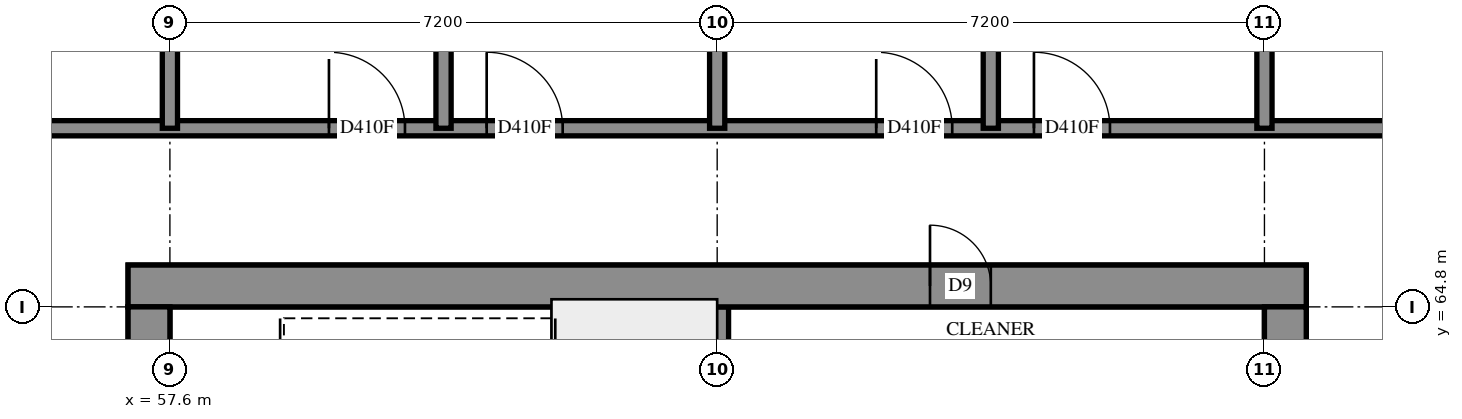
"""IFC4 building model, lengths in metres.
Left out: names, types, materials, properties, quantities, classifications, styles, units other than length and angle.
Written with IfcOpenShell. Run it as: python <this file> out.ifc"""

import sys

from ifc_helpers import new_model, si_unit, direction, frame, frame_2d, origin, place, context, subcontext, project, spatial, rectangle, extrude, element, fill, save


model = new_model("IFC4")
c1 = context("Model", 3, precision=1e-05, world=origin(), true_north=direction((0.0, 1.0)))
c2 = subcontext(c1, "Body", "Model", "MODEL_VIEW")
j1 = project(units=[si_unit("LENGTHUNIT", "METRE"), si_unit("PLANEANGLEUNIT", "RADIAN")], contexts=[c1])
p1 = place(None, origin())
s1 = spatial("IfcSite", under=j1, at=p1, CompositionType="ELEMENT")
p2 = place(p1, origin())
s2 = spatial("IfcBuilding", under=s1, at=p2, CompositionType="ELEMENT")
p3 = place(p2, frame((0.0, 0.0, 180.4)))
s3 = spatial("IfcBuildingStorey", under=s2, at=p3, CompositionType="ELEMENT", Elevation=180.4)
p4 = place(p3, frame((57.05, 65.075, -0.3), z_axis=(0.0, 0.0, 1.0), x_axis=(1.0, 0.0, 0.0)))
e1 = element("IfcWall", 1, at=p4, inside=s3, PredefinedType="SHEAR", context=c2, shape_type="SweptSolid", body=[
    extrude(rectangle(XDim=15.5, YDim=0.55, at=frame_2d((7.75, 0.0))), origin(), (0.0, 0.0, 1.0), 4.3),
])
p5 = place(p4, frame((10.55, 0.0, 0.3)))
e2 = element("IfcOpeningElement", 2, at=p5, cuts=e1, PredefinedType="OPENING", context=c2, shape_type="SweptSolid", body=[
    extrude(rectangle(XDim=0.8, YDim=2.1, at=frame_2d((0.4, 1.05))), frame((0.0, 0.285, 0.0), z_axis=(0.0, -1.0, 0.0), x_axis=(1.0, 0.0, 0.0)), (0.0, 0.0, 1.0), 0.57),
])
p6 = place(p3, frame((57.325, 50.4, -0.3), z_axis=(0.0, 0.0, 1.0), x_axis=(0.0, 1.0, 0.0)))
e3 = element("IfcWall", 3, at=p6, inside=s3, PredefinedType="SHEAR", context=c2, shape_type="SweptSolid", body=[
    extrude(rectangle(XDim=14.4, YDim=0.55, at=frame_2d((7.2, 0.0))), origin(), (0.0, 0.0, 1.0), 4.3),
])
p7 = place(p6, frame((4.55, 0.0, 0.3)))
e4 = element("IfcOpeningElement", 4, at=p7, cuts=e3, PredefinedType="OPENING", context=c2, shape_type="SweptSolid", body=[
    extrude(rectangle(XDim=1.1, YDim=2.1, at=frame_2d((0.55, 1.05))), frame((0.0, 0.285, 0.0), z_axis=(0.0, -1.0, 0.0), x_axis=(1.0, 0.0, 0.0)), (0.0, 0.0, 1.0), 0.57),
])
p8 = place(p6, frame((11.35, 0.0, 0.3)))
e5 = element("IfcOpeningElement", 5, at=p8, cuts=e3, PredefinedType="OPENING", context=c2, shape_type="SweptSolid", body=[
    extrude(rectangle(XDim=1.1, YDim=2.1, at=frame_2d((0.55, 1.05))), frame((0.0, 0.285, 0.0), z_axis=(0.0, -1.0, 0.0), x_axis=(1.0, 0.0, 0.0)), (0.0, 0.0, 1.0), 0.57),
])
p9 = place(p3, frame((72.275, 50.4, -0.3), z_axis=(0.0, 0.0, 1.0), x_axis=(0.0, 1.0, 0.0)))
e6 = element("IfcWall", 6, at=p9, inside=s3, PredefinedType="SHEAR", context=c2, shape_type="SweptSolid", body=[
    extrude(rectangle(XDim=14.4, YDim=0.55, at=frame_2d((7.2, 0.0))), origin(), (0.0, 0.0, 1.0), 4.3),
])
p10 = place(p9, frame((4.55, 0.0, 0.3)))
e7 = element("IfcOpeningElement", 7, at=p10, cuts=e6, PredefinedType="OPENING", context=c2, shape_type="SweptSolid", body=[
    extrude(rectangle(XDim=1.1, YDim=2.1, at=frame_2d((0.55, 1.05))), frame((0.0, 0.285, 0.0), z_axis=(0.0, -1.0, 0.0), x_axis=(1.0, 0.0, 0.0)), (0.0, 0.0, 1.0), 0.57),
])
p11 = place(p9, frame((11.35, 0.0, 0.3)))
e8 = element("IfcOpeningElement", 8, at=p11, cuts=e6, PredefinedType="OPENING", context=c2, shape_type="SweptSolid", body=[
    extrude(rectangle(XDim=1.1, YDim=2.1, at=frame_2d((0.55, 1.05))), frame((0.0, 0.285, 0.0), z_axis=(0.0, -1.0, 0.0), x_axis=(1.0, 0.0, 0.0)), (0.0, 0.0, 1.0), 0.57),
])
p12 = place(p3, frame((64.8, 60.6, 0.0), z_axis=(0.0, 0.0, 1.0), x_axis=(0.0, 1.0, 0.0)))
e9 = element("IfcWall", 9, at=p12, inside=s3, PredefinedType="SOLIDWALL", context=c2, shape_type="SweptSolid", body=[
    extrude(rectangle(XDim=4.2, YDim=0.3, at=frame_2d((2.1, 0.0))), origin(), (0.0, 0.0, 1.0), 4.7),
])
p13 = place(p3, frame((55.25, 67.15, 0.0), z_axis=(0.0, 0.0, 1.0), x_axis=(1.0, 0.0, 0.0)))
e10 = element("IfcWall", 10, at=p13, inside=s3, PredefinedType="PARTITIONING", context=c2, shape_type="SweptSolid", body=[
    extrude(rectangle(XDim=19.1, YDim=0.2, at=frame_2d((9.55, 0.0))), origin(), (0.0, 0.0, 1.0), 4.7),
])
p14 = place(p13, frame((4.442, 0.0, 0.0)))
e11 = element("IfcOpeningElement", 11, at=p14, cuts=e10, PredefinedType="OPENING", context=c2, shape_type="SweptSolid", body=[
    extrude(rectangle(XDim=1.0, YDim=2.1, at=frame_2d((0.5, 1.05))), frame((0.0, 0.11, 0.0), z_axis=(0.0, -1.0, 0.0), x_axis=(1.0, 0.0, 0.0)), (0.0, 0.0, 1.0), 0.22),
])
p15 = place(p13, frame((6.518, 0.0, 0.0)))
e12 = element("IfcOpeningElement", 12, at=p15, cuts=e10, PredefinedType="OPENING", context=c2, shape_type="SweptSolid", body=[
    extrude(rectangle(XDim=1.0, YDim=2.1, at=frame_2d((0.5, 1.05))), frame((0.0, 0.11, 0.0), z_axis=(0.0, -1.0, 0.0), x_axis=(1.0, 0.0, 0.0)), (0.0, 0.0, 1.0), 0.22),
])
p16 = place(p13, frame((11.643, 0.0, 0.0)))
e13 = element("IfcOpeningElement", 13, at=p16, cuts=e10, PredefinedType="OPENING", context=c2, shape_type="SweptSolid", body=[
    extrude(rectangle(XDim=1.0, YDim=2.1, at=frame_2d((0.5, 1.05))), frame((0.0, 0.11, 0.0), z_axis=(0.0, -1.0, 0.0), x_axis=(1.0, 0.0, 0.0)), (0.0, 0.0, 1.0), 0.22),
])
p17 = place(p13, frame((13.717, 0.0, 0.0)))
e14 = element("IfcOpeningElement", 14, at=p17, cuts=e10, PredefinedType="OPENING", context=c2, shape_type="SweptSolid", body=[
    extrude(rectangle(XDim=1.0, YDim=2.1, at=frame_2d((0.5, 1.05))), frame((0.0, 0.11, 0.0), z_axis=(0.0, -1.0, 0.0), x_axis=(1.0, 0.0, 0.0)), (0.0, 0.0, 1.0), 0.22),
])
for number, where, z_axis, x_axis in (
    (15, (57.6, 67.15, 0.0), (0.0, 0.0, 1.0), (0.0, 1.0, 0.0)),
    (16, (61.2, 67.15, 0.0), (0.0, 0.0, 1.0), (0.0, 1.0, 0.0)),
    (17, (64.8, 67.15, 0.0), (0.0, 0.0, 1.0), (0.0, 1.0, 0.0)),
    (18, (68.4, 67.15, 0.0), (0.0, 0.0, 1.0), (0.0, 1.0, 0.0)),
    (19, (72.0, 67.15, 0.0), (0.0, 0.0, 1.0), (0.0, 1.0, 0.0)),
):
    element("IfcWall", number, at=place(p3, frame(where, z_axis=z_axis, x_axis=x_axis)), inside=s3, PredefinedType="PARTITIONING", context=c2, shape_type="SweptSolid", body=[
        extrude(rectangle(XDim=2.5, YDim=0.2, at=frame_2d((1.25, 0.0))), origin(), (0.0, 0.0, 1.0), 4.7),
    ])
p18 = place(p5, origin())
e20 = element("IfcDoor", 20, at=p18, inside=s3, OperationType="SINGLE_SWING_RIGHT", PredefinedType="DOOR", context=c2, shape_type="SweptSolid", body=[
    extrude(rectangle(XDim=0.8, YDim=2.1, at=frame_2d((0.4, 1.05))), frame((0.0, 0.025, 0.0), z_axis=(0.0, -1.0, 0.0), x_axis=(1.0, 0.0, 0.0)), (0.0, 0.0, 1.0), 0.05),
])
fill(e2, e20)
p19 = place(p14, origin())
e21 = element("IfcDoor", 21, at=p19, inside=s3, OperationType="SINGLE_SWING_RIGHT", PredefinedType="DOOR", context=c2, shape_type="SweptSolid", body=[
    extrude(rectangle(XDim=1.0, YDim=2.1, at=frame_2d((0.5, 1.05))), frame((0.0, 0.025, 0.0), z_axis=(0.0, -1.0, 0.0), x_axis=(1.0, 0.0, 0.0)), (0.0, 0.0, 1.0), 0.05),
])
fill(e11, e21)
p20 = place(p15, origin())
e22 = element("IfcDoor", 22, at=p20, inside=s3, OperationType="SINGLE_SWING_LEFT", PredefinedType="DOOR", context=c2, shape_type="SweptSolid", body=[
    extrude(rectangle(XDim=1.0, YDim=2.1, at=frame_2d((0.5, 1.05))), frame((0.0, 0.025, 0.0), z_axis=(0.0, -1.0, 0.0), x_axis=(1.0, 0.0, 0.0)), (0.0, 0.0, 1.0), 0.05),
])
fill(e12, e22)
p21 = place(p16, origin())
e23 = element("IfcDoor", 23, at=p21, inside=s3, OperationType="SINGLE_SWING_RIGHT", PredefinedType="DOOR", context=c2, shape_type="SweptSolid", body=[
    extrude(rectangle(XDim=1.0, YDim=2.1, at=frame_2d((0.5, 1.05))), frame((0.0, 0.025, 0.0), z_axis=(0.0, -1.0, 0.0), x_axis=(1.0, 0.0, 0.0)), (0.0, 0.0, 1.0), 0.05),
])
fill(e13, e23)
p22 = place(p17, origin())
e24 = element("IfcDoor", 24, at=p22, inside=s3, OperationType="SINGLE_SWING_LEFT", PredefinedType="DOOR", context=c2, shape_type="SweptSolid", body=[
    extrude(rectangle(XDim=1.0, YDim=2.1, at=frame_2d((0.5, 1.05))), frame((0.0, 0.025, 0.0), z_axis=(0.0, -1.0, 0.0), x_axis=(1.0, 0.0, 0.0)), (0.0, 0.0, 1.0), 0.05),
])
fill(e14, e24)
save(model, sys.argv[1])
